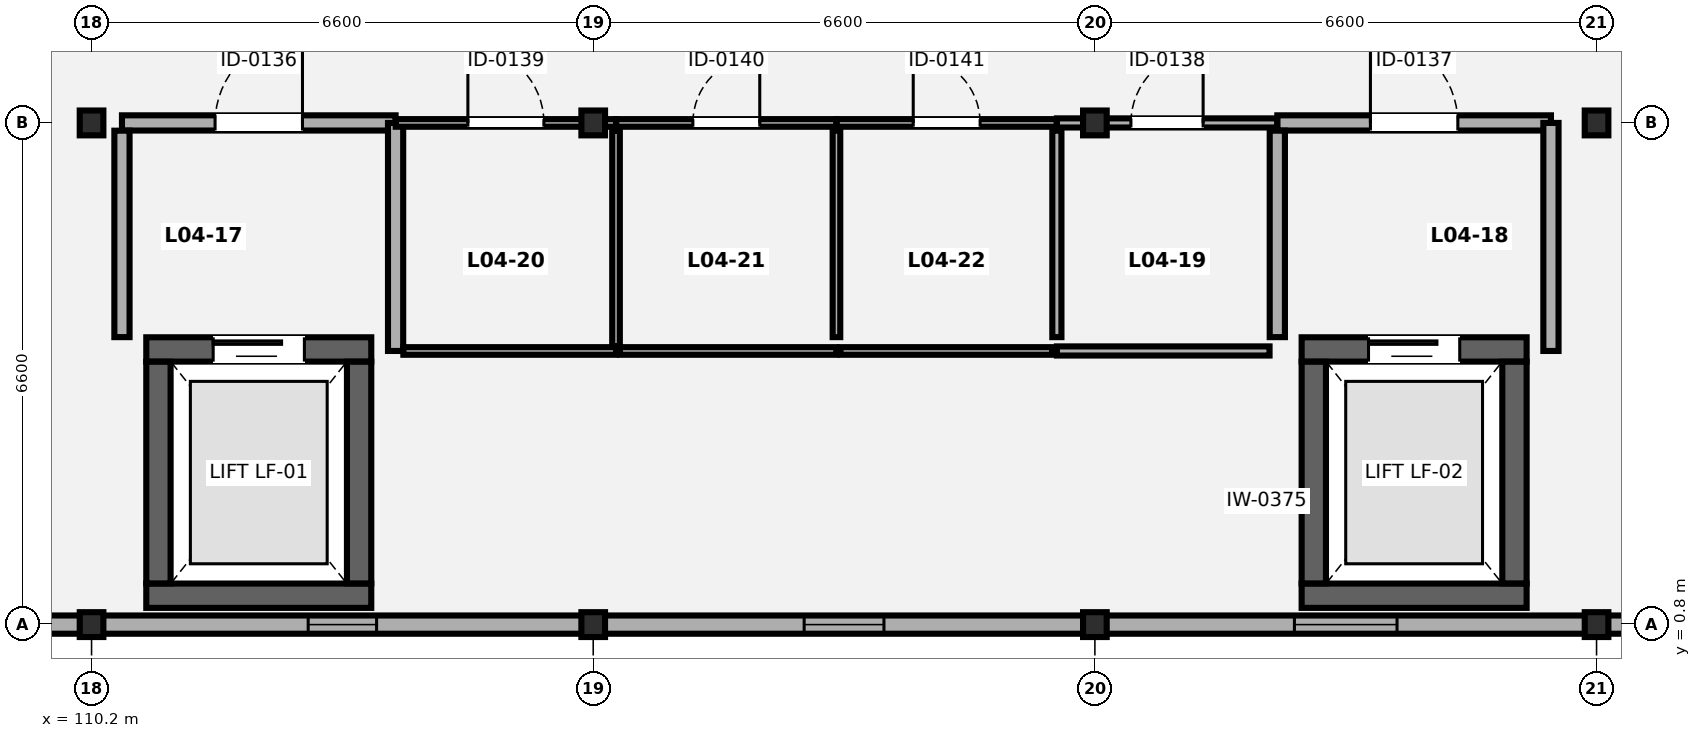
"""IFC4 building model, lengths in metres.
Left out: names, types, materials, properties, quantities, classifications, styles, units other than length and angle.
Written with IfcOpenShell. Run it as: python <this file> out.ifc"""

import sys

from ifc_helpers import new_model, si_unit, direction, frame, frame_2d, origin, origin_2d, place, context, subcontext, project, spatial, rectangle, i_section, extrude, element, fill, save


model = new_model("IFC4")
c1 = context("Model", 3, precision=1e-05, world=origin(), true_north=direction((0.0, 1.0)))
c2 = subcontext(c1, "Body", "Model", "MODEL_VIEW")
j1 = project(units=[si_unit("LENGTHUNIT", "METRE"), si_unit("PLANEANGLEUNIT", "RADIAN")], contexts=[c1])
p1 = place(None, origin())
s1 = spatial("IfcSite", under=j1, at=p1, CompositionType="ELEMENT")
p2 = place(p1, origin())
s2 = spatial("IfcBuilding", under=s1, at=p2, CompositionType="ELEMENT")
p3 = place(p2, frame((0.0, 0.0, 17.5)))
s3 = spatial("IfcBuildingStorey", under=s2, at=p3, CompositionType="ELEMENT", Elevation=17.5)
for number, where, z_axis, x_axis in (
    (1, (110.2, 0.8, 0.0), (0.0, 0.0, 1.0), (1.0, 0.0, 0.0)),
    (2, (110.2, 7.4, 0.0), (0.0, 0.0, 1.0), (1.0, 0.0, 0.0)),
    (3, (116.8, 0.8, 0.0), (0.0, 0.0, 1.0), (1.0, 0.0, 0.0)),
    (4, (116.8, 7.4, 0.0), (0.0, 0.0, 1.0), (1.0, 0.0, 0.0)),
    (5, (123.4, 0.8, 0.0), (0.0, 0.0, 1.0), (1.0, 0.0, 0.0)),
    (6, (123.4, 7.4, 0.0), (0.0, 0.0, 1.0), (1.0, 0.0, 0.0)),
    (7, (130.0, 0.8, 0.0), (0.0, 0.0, 1.0), (1.0, 0.0, 0.0)),
    (8, (130.0, 7.4, 0.0), (0.0, 0.0, 1.0), (1.0, 0.0, 0.0)),
):
    element("IfcColumn", number, at=place(p3, frame(where, z_axis=z_axis, x_axis=x_axis)), inside=s3, PredefinedType="COLUMN", context=c2, shape_type="SweptSolid", body=[
        extrude(i_section(OverallWidth=0.311, OverallDepth=0.327, WebThickness=0.016, FlangeThickness=0.025, FilletRadius=0.017, at=origin_2d()), origin(), (0.0, 0.0, 1.0), 4.2),
    ])
p4 = place(p3, frame((162.046, 0.8, 0.0), z_axis=(0.0, 0.0, 1.0), x_axis=(-1.0, 0.0, 0.0)))
e9 = element("IfcWall", 9, at=p4, inside=s3, PredefinedType="SOLIDWALL", context=c2, shape_type="SweptSolid", body=[
    extrude(rectangle(XDim=58.293, YDim=0.24, at=frame_2d((29.146, 0.0))), origin(), (0.0, 0.0, 1.0), 3.505),
])
p5 = place(p4, frame((53.896, 0.0, 0.85)))
e10 = element("IfcOpeningElement", 10, at=p5, cuts=e9, PredefinedType="OPENING", context=c2, shape_type="SweptSolid", body=[
    extrude(rectangle(XDim=2.5, YDim=1.25, at=frame_2d((1.25, 0.625))), frame((0.0, 0.13, 0.0), z_axis=(0.0, -1.0, 0.0), x_axis=(1.0, 0.0, 0.0)), (0.0, 0.0, 1.0), 0.26),
])
p6 = place(p4, frame((48.096, 0.0, 0.85)))
e11 = element("IfcOpeningElement", 11, at=p6, cuts=e9, PredefinedType="OPENING", context=c2, shape_type="SweptSolid", body=[
    extrude(rectangle(XDim=0.9, YDim=1.35, at=frame_2d((0.45, 0.675))), frame((0.0, 0.13, 0.0), z_axis=(0.0, -1.0, 0.0), x_axis=(1.0, 0.0, 0.0)), (0.0, 0.0, 1.0), 0.26),
])
p7 = place(p4, frame((41.421, 0.0, 0.85)))
e12 = element("IfcOpeningElement", 12, at=p7, cuts=e9, PredefinedType="OPENING", context=c2, shape_type="SweptSolid", body=[
    extrude(rectangle(XDim=1.05, YDim=1.35, at=frame_2d((0.525, 0.675))), frame((0.0, 0.13, 0.0), z_axis=(0.0, -1.0, 0.0), x_axis=(1.0, 0.0, 0.0)), (0.0, 0.0, 1.0), 0.26),
])
p8 = place(p4, frame((34.671, 0.0, 0.85)))
e13 = element("IfcOpeningElement", 13, at=p8, cuts=e9, PredefinedType="OPENING", context=c2, shape_type="SweptSolid", body=[
    extrude(rectangle(XDim=1.35, YDim=1.5, at=frame_2d((0.675, 0.75))), frame((0.0, 0.13, 0.0), z_axis=(0.0, -1.0, 0.0), x_axis=(1.0, 0.0, 0.0)), (0.0, 0.0, 1.0), 0.26),
])
p9 = place(p4, frame((27.947, 0.0, 0.85)))
e14 = element("IfcOpeningElement", 14, at=p9, cuts=e9, PredefinedType="OPENING", context=c2, shape_type="SweptSolid", body=[
    extrude(rectangle(XDim=1.6, YDim=1.5, at=frame_2d((0.8, 0.75))), frame((0.0, 0.13, 0.0), z_axis=(0.0, -1.0, 0.0), x_axis=(1.0, 0.0, 0.0)), (0.0, 0.0, 1.0), 0.26),
])
p10 = place(p4, frame((21.171, 0.0, 0.85)))
e15 = element("IfcOpeningElement", 15, at=p10, cuts=e9, PredefinedType="OPENING", context=c2, shape_type="SweptSolid", body=[
    extrude(rectangle(XDim=1.95, YDim=1.5, at=frame_2d((0.975, 0.75))), frame((0.0, 0.13, 0.0), z_axis=(0.0, -1.0, 0.0), x_axis=(1.0, 0.0, 0.0)), (0.0, 0.0, 1.0), 0.26),
])
p11 = place(p4, frame((14.372, 0.0, 0.85)))
e16 = element("IfcOpeningElement", 16, at=p11, cuts=e9, PredefinedType="OPENING", context=c2, shape_type="SweptSolid", body=[
    extrude(rectangle(XDim=2.35, YDim=1.5, at=frame_2d((1.175, 0.75))), frame((0.0, 0.13, 0.0), z_axis=(0.0, -1.0, 0.0), x_axis=(1.0, 0.0, 0.0)), (0.0, 0.0, 1.0), 0.26),
])
p12 = place(p4, frame((7.596, 0.0, 0.85)))
e17 = element("IfcOpeningElement", 17, at=p12, cuts=e9, PredefinedType="OPENING", context=c2, shape_type="SweptSolid", body=[
    extrude(rectangle(XDim=2.7, YDim=1.35, at=frame_2d((1.35, 0.675))), frame((0.0, 0.13, 0.0), z_axis=(0.0, -1.0, 0.0), x_axis=(1.0, 0.0, 0.0)), (0.0, 0.0, 1.0), 0.26),
])
p13 = place(p4, frame((1.296, 0.0, 0.85)))
e18 = element("IfcOpeningElement", 18, at=p13, cuts=e9, PredefinedType="OPENING", context=c2, shape_type="SweptSolid", body=[
    extrude(rectangle(XDim=2.9, YDim=1.35, at=frame_2d((1.45, 0.675))), frame((0.0, 0.13, 0.0), z_axis=(0.0, -1.0, 0.0), x_axis=(1.0, 0.0, 0.0)), (0.0, 0.0, 1.0), 0.26),
])
p14 = place(p3, frame((110.92, 1.18, 0.0), z_axis=(0.0, 0.0, 1.0), x_axis=(1.0, 0.0, 0.0)))
e19 = element("IfcWall", 19, at=p14, inside=s3, PredefinedType="SHEAR", context=c2, shape_type="SweptSolid", body=[
    extrude(rectangle(XDim=2.96, YDim=0.32, at=frame_2d((1.48, 0.0))), origin(), (0.0, 0.0, 1.0), 4.02),
])
p15 = place(p3, frame((110.92, 4.42, 0.0), z_axis=(0.0, 0.0, 1.0), x_axis=(1.0, 0.0, 0.0)))
e20 = element("IfcWall", 20, at=p15, inside=s3, PredefinedType="SHEAR", context=c2, shape_type="SweptSolid", body=[
    extrude(rectangle(XDim=2.96, YDim=0.32, at=frame_2d((1.48, 0.0))), origin(), (0.0, 0.0, 1.0), 4.02),
])
p16 = place(p15, frame((0.88, 0.0, 0.0)))
e21 = element("IfcOpeningElement", 21, at=p16, cuts=e20, PredefinedType="OPENING", context=c2, shape_type="SweptSolid", body=[
    extrude(rectangle(XDim=1.2, YDim=2.2, at=frame_2d((0.6, 1.1))), frame((0.0, 0.17, 0.0), z_axis=(0.0, -1.0, 0.0), x_axis=(1.0, 0.0, 0.0)), (0.0, 0.0, 1.0), 0.34),
])
for number, where, z_axis, x_axis in (
    (22, (111.08, 1.342, 0.0), (0.0, 0.0, 1.0), (0.0, 1.0, 0.0)),
    (23, (113.72, 1.342, 0.0), (0.0, 0.0, 1.0), (0.0, 1.0, 0.0)),
):
    element("IfcWall", number, at=place(p3, frame(where, z_axis=z_axis, x_axis=x_axis)), inside=s3, PredefinedType="SHEAR", context=c2, shape_type="SweptSolid", body=[
        extrude(rectangle(XDim=2.916, YDim=0.32, at=frame_2d((1.458, 0.0))), origin(), (0.0, 0.0, 1.0), 4.02),
    ])
p17 = place(p3, frame((126.12, 1.18, 0.0), z_axis=(0.0, 0.0, 1.0), x_axis=(1.0, 0.0, 0.0)))
e24 = element("IfcWall", 24, at=p17, inside=s3, PredefinedType="SHEAR", context=c2, shape_type="SweptSolid", body=[
    extrude(rectangle(XDim=2.96, YDim=0.32, at=frame_2d((1.48, 0.0))), origin(), (0.0, 0.0, 1.0), 4.02),
])
p18 = place(p3, frame((126.12, 4.42, 0.0), z_axis=(0.0, 0.0, 1.0), x_axis=(1.0, 0.0, 0.0)))
e25 = element("IfcWall", 25, at=p18, inside=s3, PredefinedType="SHEAR", context=c2, shape_type="SweptSolid", body=[
    extrude(rectangle(XDim=2.96, YDim=0.32, at=frame_2d((1.48, 0.0))), origin(), (0.0, 0.0, 1.0), 4.02),
])
p19 = place(p18, frame((0.88, 0.0, 0.0)))
e26 = element("IfcOpeningElement", 26, at=p19, cuts=e25, PredefinedType="OPENING", context=c2, shape_type="SweptSolid", body=[
    extrude(rectangle(XDim=1.2, YDim=2.2, at=frame_2d((0.6, 1.1))), frame((0.0, 0.17, 0.0), z_axis=(0.0, -1.0, 0.0), x_axis=(1.0, 0.0, 0.0)), (0.0, 0.0, 1.0), 0.34),
])
for number, where, z_axis, x_axis in (
    (27, (126.28, 1.342, 0.0), (0.0, 0.0, 1.0), (0.0, 1.0, 0.0)),
    (28, (128.92, 1.342, 0.0), (0.0, 0.0, 1.0), (0.0, 1.0, 0.0)),
):
    element("IfcWall", number, at=place(p3, frame(where, z_axis=z_axis, x_axis=x_axis)), inside=s3, PredefinedType="SHEAR", context=c2, shape_type="SweptSolid", body=[
        extrude(rectangle(XDim=2.916, YDim=0.32, at=frame_2d((1.458, 0.0))), origin(), (0.0, 0.0, 1.0), 4.02),
    ])
p20 = place(p3, frame((110.6, 7.4, 0.0), z_axis=(0.0, 0.0, 1.0), x_axis=(1.0, 0.0, 0.0)))
e29 = element("IfcWall", 29, at=p20, inside=s3, PredefinedType="SOLIDWALL", context=c2, shape_type="SweptSolid", body=[
    extrude(rectangle(XDim=3.6, YDim=0.2, at=frame_2d((1.8, 0.0))), origin(), (0.0, 0.0, 1.0), 3.293),
])
p21 = place(p20, frame((1.225, 0.0, 0.0)))
e30 = element("IfcOpeningElement", 30, at=p21, cuts=e29, PredefinedType="OPENING", context=c2, shape_type="SweptSolid", body=[
    extrude(rectangle(XDim=1.15, YDim=2.15, at=frame_2d((0.575, 1.075))), frame((0.0, 0.11, 0.0), z_axis=(0.0, -1.0, 0.0), x_axis=(1.0, 0.0, 0.0)), (0.0, 0.0, 1.0), 0.22),
])
p22 = place(p3, frame((110.6, 4.582, 0.0), z_axis=(0.0, 0.0, 1.0), x_axis=(0.0, 1.0, 0.0)))
e31 = element("IfcWall", 31, at=p22, inside=s3, PredefinedType="SOLIDWALL", context=c2, shape_type="SweptSolid", body=[
    extrude(rectangle(XDim=2.716, YDim=0.2, at=frame_2d((1.358, 0.0))), origin(), (0.0, 0.0, 1.0), 4.02),
])
p23 = place(p3, frame((114.2, 4.4, 0.0), z_axis=(0.0, 0.0, 1.0), x_axis=(0.0, 1.0, 0.0)))
e32 = element("IfcWall", 32, at=p23, inside=s3, PredefinedType="SOLIDWALL", context=c2, shape_type="SweptSolid", body=[
    extrude(rectangle(XDim=3.0, YDim=0.2, at=frame_2d((1.5, 0.0))), origin(), (0.0, 0.0, 1.0), 4.02),
])
p24 = place(p3, frame((125.8, 7.4, 0.0), z_axis=(0.0, 0.0, 1.0), x_axis=(1.0, 0.0, 0.0)))
e33 = element("IfcWall", 33, at=p24, inside=s3, PredefinedType="SOLIDWALL", context=c2, shape_type="SweptSolid", body=[
    extrude(rectangle(XDim=3.6, YDim=0.2, at=frame_2d((1.8, 0.0))), origin(), (0.0, 0.0, 1.0), 3.293),
])
p25 = place(p24, frame((1.225, 0.0, 0.0)))
e34 = element("IfcOpeningElement", 34, at=p25, cuts=e33, PredefinedType="OPENING", context=c2, shape_type="SweptSolid", body=[
    extrude(rectangle(XDim=1.15, YDim=2.15, at=frame_2d((0.575, 1.075))), frame((0.0, 0.11, 0.0), z_axis=(0.0, -1.0, 0.0), x_axis=(1.0, 0.0, 0.0)), (0.0, 0.0, 1.0), 0.22),
])
p26 = place(p3, frame((125.8, 4.582, 0.0), z_axis=(0.0, 0.0, 1.0), x_axis=(0.0, 1.0, 0.0)))
e35 = element("IfcWall", 35, at=p26, inside=s3, PredefinedType="SOLIDWALL", context=c2, shape_type="SweptSolid", body=[
    extrude(rectangle(XDim=2.716, YDim=0.2, at=frame_2d((1.358, 0.0))), origin(), (0.0, 0.0, 1.0), 4.02),
])
p27 = place(p3, frame((129.4, 4.4, 0.0), z_axis=(0.0, 0.0, 1.0), x_axis=(0.0, 1.0, 0.0)))
e36 = element("IfcWall", 36, at=p27, inside=s3, PredefinedType="SOLIDWALL", context=c2, shape_type="SweptSolid", body=[
    extrude(rectangle(XDim=3.0, YDim=0.2, at=frame_2d((1.5, 0.0))), origin(), (0.0, 0.0, 1.0), 4.02),
])
p28 = place(p3, frame((122.9, 4.4, 0.0), z_axis=(0.0, 0.0, 1.0), x_axis=(1.0, 0.0, 0.0)))
e37 = element("IfcWall", 37, at=p28, inside=s3, PredefinedType="PARTITIONING", context=c2, shape_type="SweptSolid", body=[
    extrude(rectangle(XDim=2.798, YDim=0.12, at=frame_2d((1.399, 0.0))), origin(), (0.0, 0.0, 1.0), 4.02),
])
p29 = place(p3, frame((122.9, 7.4, 0.0), z_axis=(0.0, 0.0, 1.0), x_axis=(1.0, 0.0, 0.0)))
e38 = element("IfcWall", 38, at=p29, inside=s3, PredefinedType="PARTITIONING", context=c2, shape_type="SweptSolid", body=[
    extrude(rectangle(XDim=2.898, YDim=0.12, at=frame_2d((1.449, 0.0))), origin(), (0.0, 0.0, 1.0), 3.293),
])
p30 = place(p29, frame((0.974, 0.0, 0.0)))
e39 = element("IfcOpeningElement", 39, at=p30, cuts=e38, PredefinedType="OPENING", context=c2, shape_type="SweptSolid", body=[
    extrude(rectangle(XDim=0.95, YDim=2.1, at=frame_2d((0.475, 1.05))), frame((0.0, 0.07, 0.0), z_axis=(0.0, -1.0, 0.0), x_axis=(1.0, 0.0, 0.0)), (0.0, 0.0, 1.0), 0.14),
])
p31 = place(p3, frame((122.9, 4.582, 0.0), z_axis=(0.0, 0.0, 1.0), x_axis=(0.0, 1.0, 0.0)))
e40 = element("IfcWall", 40, at=p31, inside=s3, PredefinedType="PARTITIONING", context=c2, shape_type="SweptSolid", body=[
    extrude(rectangle(XDim=2.716, YDim=0.12, at=frame_2d((1.358, 0.0))), origin(), (0.0, 0.0, 1.0), 4.02),
])
p32 = place(p3, frame((114.302, 4.4, 0.0), z_axis=(0.0, 0.0, 1.0), x_axis=(1.0, 0.0, 0.0)))
e41 = element("IfcWall", 41, at=p32, inside=s3, PredefinedType="PARTITIONING", context=c2, shape_type="SweptSolid", body=[
    extrude(rectangle(XDim=2.798, YDim=0.1, at=frame_2d((1.399, 0.0))), origin(), (0.0, 0.0, 1.0), 4.02),
])
p33 = place(p3, frame((114.202, 7.4, 0.0), z_axis=(0.0, 0.0, 1.0), x_axis=(1.0, 0.0, 0.0)))
e42 = element("IfcWall", 42, at=p33, inside=s3, PredefinedType="PARTITIONING", context=c2, shape_type="SweptSolid", body=[
    extrude(rectangle(XDim=2.898, YDim=0.1, at=frame_2d((1.449, 0.0))), origin(), (0.0, 0.0, 1.0), 3.293),
])
p34 = place(p33, frame((0.949, 0.0, 0.0)))
e43 = element("IfcOpeningElement", 43, at=p34, cuts=e42, PredefinedType="OPENING", context=c2, shape_type="SweptSolid", body=[
    extrude(rectangle(XDim=1.0, YDim=2.1, at=frame_2d((0.5, 1.05))), frame((0.0, 0.06, 0.0), z_axis=(0.0, -1.0, 0.0), x_axis=(1.0, 0.0, 0.0)), (0.0, 0.0, 1.0), 0.12),
])
p35 = place(p3, frame((117.1, 4.462, 0.0), z_axis=(0.0, 0.0, 1.0), x_axis=(0.0, 1.0, 0.0)))
e44 = element("IfcWall", 44, at=p35, inside=s3, PredefinedType="PARTITIONING", context=c2, shape_type="SweptSolid", body=[
    extrude(rectangle(XDim=2.836, YDim=0.1, at=frame_2d((1.418, 0.0))), origin(), (0.0, 0.0, 1.0), 4.02),
])
p36 = place(p3, frame((117.152, 4.4, 0.0), z_axis=(0.0, 0.0, 1.0), x_axis=(1.0, 0.0, 0.0)))
e45 = element("IfcWall", 45, at=p36, inside=s3, PredefinedType="PARTITIONING", context=c2, shape_type="SweptSolid", body=[
    extrude(rectangle(XDim=2.848, YDim=0.1, at=frame_2d((1.424, 0.0))), origin(), (0.0, 0.0, 1.0), 4.02),
])
p37 = place(p3, frame((117.102, 7.4, 0.0), z_axis=(0.0, 0.0, 1.0), x_axis=(1.0, 0.0, 0.0)))
e46 = element("IfcWall", 46, at=p37, inside=s3, PredefinedType="PARTITIONING", context=c2, shape_type="SweptSolid", body=[
    extrude(rectangle(XDim=2.898, YDim=0.1, at=frame_2d((1.449, 0.0))), origin(), (0.0, 0.0, 1.0), 3.293),
])
p38 = place(p37, frame((1.009, 0.0, 0.0)))
e47 = element("IfcOpeningElement", 47, at=p38, cuts=e46, PredefinedType="OPENING", context=c2, shape_type="SweptSolid", body=[
    extrude(rectangle(XDim=0.88, YDim=2.08, at=frame_2d((0.44, 1.04))), frame((0.0, 0.06, 0.0), z_axis=(0.0, -1.0, 0.0), x_axis=(1.0, 0.0, 0.0)), (0.0, 0.0, 1.0), 0.12),
])
p39 = place(p3, frame((120.0, 4.582, 0.0), z_axis=(0.0, 0.0, 1.0), x_axis=(0.0, 1.0, 0.0)))
e48 = element("IfcWall", 48, at=p39, inside=s3, PredefinedType="PARTITIONING", context=c2, shape_type="SweptSolid", body=[
    extrude(rectangle(XDim=2.716, YDim=0.1, at=frame_2d((1.358, 0.0))), origin(), (0.0, 0.0, 1.0), 4.02),
])
p40 = place(p3, frame((120.052, 4.4, 0.0), z_axis=(0.0, 0.0, 1.0), x_axis=(1.0, 0.0, 0.0)))
e49 = element("IfcWall", 49, at=p40, inside=s3, PredefinedType="PARTITIONING", context=c2, shape_type="SweptSolid", body=[
    extrude(rectangle(XDim=2.786, YDim=0.1, at=frame_2d((1.393, 0.0))), origin(), (0.0, 0.0, 1.0), 4.02),
])
p41 = place(p3, frame((120.002, 7.4, 0.0), z_axis=(0.0, 0.0, 1.0), x_axis=(1.0, 0.0, 0.0)))
e50 = element("IfcWall", 50, at=p41, inside=s3, PredefinedType="PARTITIONING", context=c2, shape_type="SweptSolid", body=[
    extrude(rectangle(XDim=2.896, YDim=0.1, at=frame_2d((1.448, 0.0))), origin(), (0.0, 0.0, 1.0), 3.293),
])
p42 = place(p41, frame((1.008, 0.0, 0.0)))
e51 = element("IfcOpeningElement", 51, at=p42, cuts=e50, PredefinedType="OPENING", context=c2, shape_type="SweptSolid", body=[
    extrude(rectangle(XDim=0.88, YDim=2.08, at=frame_2d((0.44, 1.04))), frame((0.0, 0.06, 0.0), z_axis=(0.0, -1.0, 0.0), x_axis=(1.0, 0.0, 0.0)), (0.0, 0.0, 1.0), 0.12),
])
p43 = place(p6, origin())
e52 = element("IfcWindow", 52, at=p43, inside=s3, PartitioningType="SINGLE_PANEL", PredefinedType="WINDOW", context=c2, shape_type="SweptSolid", body=[
    extrude(rectangle(XDim=0.9, YDim=1.35, at=frame_2d((0.45, 0.675))), frame((0.0, 0.03, 0.0), z_axis=(0.0, -1.0, 0.0), x_axis=(1.0, 0.0, 0.0)), (0.0, 0.0, 1.0), 0.06),
])
fill(e11, e52)
p44 = place(p7, origin())
e53 = element("IfcWindow", 53, at=p44, inside=s3, PartitioningType="SINGLE_PANEL", PredefinedType="WINDOW", context=c2, shape_type="SweptSolid", body=[
    extrude(rectangle(XDim=1.05, YDim=1.35, at=frame_2d((0.525, 0.675))), frame((0.0, 0.03, 0.0), z_axis=(0.0, -1.0, 0.0), x_axis=(1.0, 0.0, 0.0)), (0.0, 0.0, 1.0), 0.06),
])
fill(e12, e53)
p45 = place(p8, origin())
e54 = element("IfcWindow", 54, at=p45, inside=s3, PartitioningType="SINGLE_PANEL", PredefinedType="WINDOW", context=c2, shape_type="SweptSolid", body=[
    extrude(rectangle(XDim=1.35, YDim=1.5, at=frame_2d((0.675, 0.75))), frame((0.0, 0.03, 0.0), z_axis=(0.0, -1.0, 0.0), x_axis=(1.0, 0.0, 0.0)), (0.0, 0.0, 1.0), 0.06),
])
fill(e13, e54)
p46 = place(p16, origin())
e55 = element("IfcDoor", 55, at=p46, inside=s3, OperationType="SLIDING_TO_LEFT", PredefinedType="DOOR", context=c2, shape_type="SweptSolid", body=[
    extrude(rectangle(XDim=1.2, YDim=2.2, at=frame_2d((0.6, 1.1))), frame((0.0, 0.025, 0.0), z_axis=(0.0, -1.0, 0.0), x_axis=(1.0, 0.0, 0.0)), (0.0, 0.0, 1.0), 0.05),
])
fill(e21, e55)
p47 = place(p19, origin())
e56 = element("IfcDoor", 56, at=p47, inside=s3, OperationType="SLIDING_TO_LEFT", PredefinedType="DOOR", context=c2, shape_type="SweptSolid", body=[
    extrude(rectangle(XDim=1.2, YDim=2.2, at=frame_2d((0.6, 1.1))), frame((0.0, 0.025, 0.0), z_axis=(0.0, -1.0, 0.0), x_axis=(1.0, 0.0, 0.0)), (0.0, 0.0, 1.0), 0.05),
])
fill(e26, e56)
p48 = place(p21, origin())
e57 = element("IfcDoor", 57, at=p48, inside=s3, OperationType="SINGLE_SWING_RIGHT", PredefinedType="DOOR", context=c2, shape_type="SweptSolid", body=[
    extrude(rectangle(XDim=1.15, YDim=2.15, at=frame_2d((0.575, 1.075))), frame((0.0, 0.025, 0.0), z_axis=(0.0, -1.0, 0.0), x_axis=(1.0, 0.0, 0.0)), (0.0, 0.0, 1.0), 0.05),
])
fill(e30, e57)
p49 = place(p25, origin())
e58 = element("IfcDoor", 58, at=p49, inside=s3, OperationType="SINGLE_SWING_LEFT", PredefinedType="DOOR", context=c2, shape_type="SweptSolid", body=[
    extrude(rectangle(XDim=1.15, YDim=2.15, at=frame_2d((0.575, 1.075))), frame((0.0, 0.025, 0.0), z_axis=(0.0, -1.0, 0.0), x_axis=(1.0, 0.0, 0.0)), (0.0, 0.0, 1.0), 0.05),
])
fill(e34, e58)
p50 = place(p30, origin())
e59 = element("IfcDoor", 59, at=p50, inside=s3, OperationType="SINGLE_SWING_RIGHT", PredefinedType="DOOR", context=c2, shape_type="SweptSolid", body=[
    extrude(rectangle(XDim=0.95, YDim=2.1, at=frame_2d((0.475, 1.05))), frame((0.0, 0.025, 0.0), z_axis=(0.0, -1.0, 0.0), x_axis=(1.0, 0.0, 0.0)), (0.0, 0.0, 1.0), 0.05),
])
fill(e39, e59)
p51 = place(p34, origin())
e60 = element("IfcDoor", 60, at=p51, inside=s3, OperationType="SINGLE_SWING_LEFT", PredefinedType="DOOR", context=c2, shape_type="SweptSolid", body=[
    extrude(rectangle(XDim=1.0, YDim=2.1, at=frame_2d((0.5, 1.05))), frame((0.0, 0.025, 0.0), z_axis=(0.0, -1.0, 0.0), x_axis=(1.0, 0.0, 0.0)), (0.0, 0.0, 1.0), 0.05),
])
fill(e43, e60)
p52 = place(p38, origin())
e61 = element("IfcDoor", 61, at=p52, inside=s3, OperationType="SINGLE_SWING_RIGHT", PredefinedType="DOOR", context=c2, shape_type="SweptSolid", body=[
    extrude(rectangle(XDim=0.88, YDim=2.08, at=frame_2d((0.44, 1.04))), frame((0.0, 0.025, 0.0), z_axis=(0.0, -1.0, 0.0), x_axis=(1.0, 0.0, 0.0)), (0.0, 0.0, 1.0), 0.05),
])
fill(e47, e61)
p53 = place(p42, origin())
e62 = element("IfcDoor", 62, at=p53, inside=s3, OperationType="SINGLE_SWING_LEFT", PredefinedType="DOOR", context=c2, shape_type="SweptSolid", body=[
    extrude(rectangle(XDim=0.88, YDim=2.08, at=frame_2d((0.44, 1.04))), frame((0.0, 0.025, 0.0), z_axis=(0.0, -1.0, 0.0), x_axis=(1.0, 0.0, 0.0)), (0.0, 0.0, 1.0), 0.05),
])
fill(e51, e62)
save(model, sys.argv[1])
